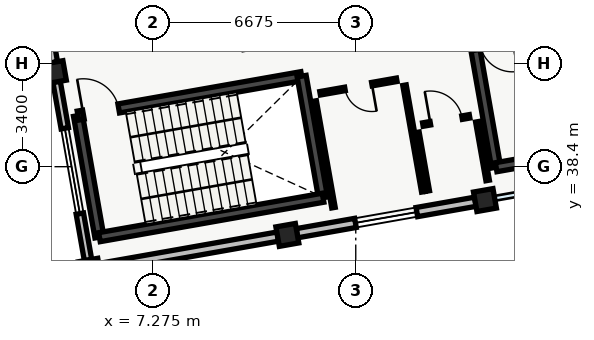
"""IFC4 building model, lengths in metres.
Left out: names, types, materials, properties, quantities, classifications, styles, units other than length and angle.
Written with IfcOpenShell. Run it as: python <this file> out.ifc"""

import sys

from ifc_helpers import new_model, si_unit, direction, frame, frame_2d, origin, origin_2d, place, context, subcontext, project, spatial, rectangle, extrude, element, fill, save


model = new_model("IFC4")
c1 = context("Model", 3, precision=1e-05, world=origin(), true_north=direction((0.0, 1.0)))
c2 = subcontext(c1, "Body", "Model", "MODEL_VIEW")
j1 = project(units=[si_unit("LENGTHUNIT", "METRE"), si_unit("PLANEANGLEUNIT", "RADIAN")], contexts=[c1])
p1 = place(None, origin())
s1 = spatial("IfcSite", under=j1, at=p1, CompositionType="ELEMENT")
p2 = place(p1, origin())
s2 = spatial("IfcBuilding", under=s1, at=p2, CompositionType="ELEMENT")
p3 = place(p2, frame((0.0, 0.0, 9.6)))
s3 = spatial("IfcBuildingStorey", under=s2, at=p3, CompositionType="ELEMENT", Elevation=9.6)
for number, where, z_axis, x_axis in (
    (1, (5.2, 35.01, 0.0), (0.0, 0.0, 1.0), (0.985, 0.174, 0.0)),
    (2, (4.054, 41.51, 0.0), (0.0, 0.0, 1.0), (0.985, 0.174, 0.0)),
    (3, (11.7, 36.156, 0.0), (0.0, 0.0, 1.0), (0.985, 0.174, 0.0)),
    (4, (18.199, 37.302, 0.0), (0.0, 0.0, 1.0), (0.985, 0.174, 0.0)),
):
    element("IfcColumn", number, at=place(p3, frame(where, z_axis=z_axis, x_axis=x_axis)), inside=s3, PredefinedType="COLUMN", context=c2, shape_type="SweptSolid", body=[
        extrude(rectangle(XDim=0.65, YDim=0.65, at=origin_2d()), origin(), (0.0, 0.0, 1.0), 4.32),
    ])
p4 = place(p3, frame((5.145, 35.325, 0.0), z_axis=(0.0, 0.0, 1.0), x_axis=(-0.17368484894, 0.984801286173, 0.0)))
e5 = element("IfcWall", 5, at=p4, inside=s3, PredefinedType="STANDARD", context=c2, shape_type="SweptSolid", body=[
    extrude(rectangle(XDim=5.96, YDim=0.245, at=frame_2d((2.98, 0.0))), origin(), (0.0, 0.0, 1.0), 3.855),
])
p5 = place(p4, frame((1.555, 0.0, 0.95)))
e6 = element("IfcOpeningElement", 6, at=p5, cuts=e5, PredefinedType="OPENING", context=c2, shape_type="SweptSolid", body=[
    extrude(rectangle(XDim=2.85, YDim=1.5, at=frame_2d((1.425, 0.75))), frame((0.0, 0.123, 0.0), z_axis=(0.0, -1.0, 0.0), x_axis=(1.0, 0.0, 0.0)), (0.0, 0.0, 1.0), 0.245),
])
p6 = place(p3, frame((3.998, 41.825, 0.0), z_axis=(0.0, 0.0, 1.0), x_axis=(-0.173645120828, 0.98480829201, 0.0)))
e7 = element("IfcWall", 7, at=p6, inside=s3, PredefinedType="STANDARD", context=c2, shape_type="SweptSolid", body=[
    extrude(rectangle(XDim=5.96, YDim=0.29, at=frame_2d((2.98, 0.0))), origin(), (0.0, 0.0, 1.0), 3.855),
])
p7 = place(p6, frame((2.34, 0.0, 0.95)))
e8 = element("IfcOpeningElement", 8, at=p7, cuts=e7, PredefinedType="OPENING", context=c2, shape_type="SweptSolid", body=[
    extrude(rectangle(XDim=1.28, YDim=1.42, at=frame_2d((0.64, 0.71))), frame((0.0, 0.145, 0.0), z_axis=(0.0, -1.0, 0.0), x_axis=(1.0, 0.0, 0.0)), (0.0, 0.0, 1.0), 0.29),
])
p8 = place(p3, frame((17.884, 37.247, 0.0), z_axis=(0.0, 0.0, 1.0), x_axis=(-0.98480829201, -0.173645120828, 0.0)))
e9 = element("IfcWall", 9, at=p8, inside=s3, PredefinedType="STANDARD", context=c2, shape_type="SweptSolid", body=[
    extrude(rectangle(XDim=5.96, YDim=0.305, at=frame_2d((2.98, 0.0))), origin(), (0.0, 0.0, 1.0), 3.855),
])
p9 = place(p8, frame((1.955, 0.0, 0.95)))
e10 = element("IfcOpeningElement", 10, at=p9, cuts=e9, PredefinedType="OPENING", context=c2, shape_type="SweptSolid", body=[
    extrude(rectangle(XDim=2.05, YDim=1.7, at=frame_2d((1.025, 0.85))), frame((0.0, 0.152, 0.0), z_axis=(0.0, -1.0, 0.0), x_axis=(1.0, 0.0, 0.0)), (0.0, 0.0, 1.0), 0.305),
])
p10 = place(p3, frame((11.385, 36.101, 0.0), z_axis=(0.0, 0.0, 1.0), x_axis=(-0.98480829201, -0.173645120828, 0.0)))
e11 = element("IfcWall", 11, at=p10, inside=s3, PredefinedType="STANDARD", context=c2, shape_type="SweptSolid", body=[
    extrude(rectangle(XDim=5.96, YDim=0.305, at=frame_2d((2.98, 0.0))), origin(), (0.0, 0.0, 1.0), 3.855),
])
p11 = place(p3, frame((5.519, 36.082, 0.0), z_axis=(0.0, 0.0, 1.0), x_axis=(-0.173665267602, 0.984804739443, 0.0)))
e12 = element("IfcWall", 12, at=p11, inside=s3, PredefinedType="SHEAR", context=c2, shape_type="SweptSolid", body=[
    extrude(rectangle(XDim=4.06, YDim=0.3, at=frame_2d((2.03, 0.0))), origin(), (0.0, 0.0, 1.0), 4.28),
])
p12 = place(p3, frame((4.814, 40.08, 0.0), z_axis=(0.0, 0.0, 1.0), x_axis=(0.984802636214, 0.173677193974, 0.0)))
e13 = element("IfcWall", 13, at=p12, inside=s3, PredefinedType="SHEAR", context=c2, shape_type="SweptSolid", body=[
    extrude(rectangle(XDim=7.47, YDim=0.3, at=frame_2d((3.735, 0.0))), origin(), (0.0, 0.0, 1.0), 4.28),
])
p13 = place(p12, frame((0.18, 0.0, 0.0)))
e14 = element("IfcOpeningElement", 14, at=p13, cuts=e13, PredefinedType="OPENING", context=c2, shape_type="SweptSolid", body=[
    extrude(rectangle(XDim=1.18, YDim=2.15, at=frame_2d((0.59, 1.075))), frame((0.0, 0.15, 0.0), z_axis=(0.0, -1.0, 0.0), x_axis=(1.0, 0.0, 0.0)), (0.0, 0.0, 1.0), 0.3),
])
p14 = place(p3, frame((12.17, 41.377, 0.0), z_axis=(0.0, 0.0, 1.0), x_axis=(0.173654983803, -0.984806552883, 0.0)))
e15 = element("IfcWall", 15, at=p14, inside=s3, PredefinedType="SHEAR", context=c2, shape_type="SweptSolid", body=[
    extrude(rectangle(XDim=4.06, YDim=0.3, at=frame_2d((2.03, 0.0))), origin(), (0.0, 0.0, 1.0), 4.28),
])
p15 = place(p3, frame((12.875, 37.379, 0.0), z_axis=(0.0, 0.0, 1.0), x_axis=(-0.984808225754, -0.173645496596, 0.0)))
e16 = element("IfcWall", 16, at=p15, inside=s3, PredefinedType="SHEAR", context=c2, shape_type="SweptSolid", body=[
    extrude(rectangle(XDim=7.47, YDim=0.3, at=frame_2d((3.735, 0.0))), origin(), (0.0, 0.0, 1.0), 4.28),
])
p16 = place(p3, frame((18.567, 38.383, 0.0), z_axis=(0.0, 0.0, 1.0), x_axis=(-0.173606946886, 0.984815022221, 0.0)))
e17 = element("IfcWall", 17, at=p16, inside=s3, PredefinedType="SHEAR", context=c2, shape_type="SweptSolid", body=[
    extrude(rectangle(XDim=4.06, YDim=0.3, at=frame_2d((2.03, 0.0))), origin(), (0.0, 0.0, 1.0), 4.28),
])
p17 = place(p3, frame((25.924, 39.68, 0.0), z_axis=(0.0, 0.0, 1.0), x_axis=(-0.984809211193, -0.173639907711, 0.0)))
e18 = element("IfcWall", 18, at=p17, inside=s3, PredefinedType="SHEAR", context=c2, shape_type="SweptSolid", body=[
    extrude(rectangle(XDim=7.47, YDim=0.3, at=frame_2d((3.735, 0.0))), origin(), (0.0, 0.0, 1.0), 4.28),
])
p18 = place(p3, frame((16.171, 37.574, 0.0), z_axis=(0.0, 0.0, 1.0), x_axis=(-0.173644490041, 0.984808403233, 0.0)))
e19 = element("IfcWall", 19, at=p18, inside=s3, PredefinedType="PARTITIONING", context=c2, shape_type="SweptSolid", body=[
    extrude(rectangle(XDim=3.56, YDim=0.115, at=frame_2d((1.78, 0.0))), origin(), (0.0, 0.0, 1.0), 3.95),
])
p19 = place(p3, frame((15.298, 41.259, 0.0), z_axis=(0.0, 0.0, 1.0), x_axis=(-0.984803714572, -0.17367107924, 0.0)))
e20 = element("IfcWall", 20, at=p19, inside=s3, PredefinedType="PARTITIONING", context=c2, shape_type="SweptSolid", body=[
    extrude(rectangle(XDim=2.56, YDim=0.115, at=frame_2d((1.28, 0.0))), origin(), (0.0, 0.0, 1.0), 3.95),
])
p20 = place(p19, frame((0.83, 0.0, 0.0)))
e21 = element("IfcOpeningElement", 21, at=p20, cuts=e20, PredefinedType="OPENING", context=c2, shape_type="SweptSolid", body=[
    extrude(rectangle(XDim=0.9, YDim=2.1, at=frame_2d((0.45, 1.05))), frame((0.0, 0.058, 0.0), z_axis=(0.0, -1.0, 0.0), x_axis=(1.0, 0.0, 0.0)), (0.0, 0.0, 1.0), 0.115),
])
p21 = place(p3, frame((12.599, 40.559, 0.0), z_axis=(0.0, 0.0, 1.0), x_axis=(0.173644490041, -0.984808403233, 0.0)))
e22 = element("IfcWall", 22, at=p21, inside=s3, PredefinedType="PARTITIONING", context=c2, shape_type="SweptSolid", body=[
    extrude(rectangle(XDim=3.56, YDim=0.115, at=frame_2d((1.78, 0.0))), origin(), (0.0, 0.0, 1.0), 3.95),
])
p22 = place(p3, frame((18.289, 37.948, 0.0), z_axis=(0.0, 0.0, 1.0), x_axis=(-0.173643211285, 0.984808628706, 0.0)))
e23 = element("IfcWall", 23, at=p22, inside=s3, PredefinedType="PARTITIONING", context=c2, shape_type="SweptSolid", body=[
    extrude(rectangle(XDim=1.96, YDim=0.115, at=frame_2d((0.98, 0.0))), origin(), (0.0, 0.0, 1.0), 3.655),
])
p23 = place(p3, frame((17.694, 40.056, 0.0), z_axis=(0.0, 0.0, 1.0), x_axis=(-0.984797734253, -0.173704987291, 0.0)))
e24 = element("IfcWall", 24, at=p23, inside=s3, PredefinedType="PARTITIONING", context=c2, shape_type="SweptSolid", body=[
    extrude(rectangle(XDim=1.56, YDim=0.115, at=frame_2d((0.78, 0.0))), origin(), (0.0, 0.0, 1.0), 3.95),
])
p24 = place(p23, frame((0.25, 0.0, 0.0)))
e25 = element("IfcOpeningElement", 25, at=p24, cuts=e24, PredefinedType="OPENING", context=c2, shape_type="SweptSolid", body=[
    extrude(rectangle(XDim=1.06, YDim=2.12, at=frame_2d((0.53, 1.06))), frame((0.0, 0.058, 0.0), z_axis=(0.0, -1.0, 0.0), x_axis=(1.0, 0.0, 0.0)), (0.0, 0.0, 1.0), 0.115),
])
p25 = place(p3, frame((15.979, 39.53, 0.0), z_axis=(0.0, 0.0, 1.0), x_axis=(0.173643211285, -0.984808628706, 0.0)))
e26 = element("IfcWall", 26, at=p25, inside=s3, PredefinedType="PARTITIONING", context=c2, shape_type="SweptSolid", body=[
    extrude(rectangle(XDim=1.96, YDim=0.115, at=frame_2d((0.98, 0.0))), origin(), (0.0, 0.0, 1.0), 3.95),
])
p26 = place(p5, origin())
e27 = element("IfcWindow", 27, at=p26, inside=s3, PartitioningType="SINGLE_PANEL", PredefinedType="WINDOW", context=c2, shape_type="SweptSolid", body=[
    extrude(rectangle(XDim=2.85, YDim=1.5, at=frame_2d((1.425, 0.75))), frame((0.0, 0.03, 0.0), z_axis=(0.0, -1.0, 0.0), x_axis=(1.0, 0.0, 0.0)), (0.0, 0.0, 1.0), 0.06),
])
fill(e6, e27)
p27 = place(p9, origin())
e28 = element("IfcWindow", 28, at=p27, inside=s3, PartitioningType="SINGLE_PANEL", PredefinedType="WINDOW", context=c2, shape_type="SweptSolid", body=[
    extrude(rectangle(XDim=2.05, YDim=1.7, at=frame_2d((1.025, 0.85))), frame((0.0, 0.03, 0.0), z_axis=(0.0, -1.0, 0.0), x_axis=(1.0, 0.0, 0.0)), (0.0, 0.0, 1.0), 0.06),
])
fill(e10, e28)
p28 = place(p13, origin())
e29 = element("IfcDoor", 29, at=p28, inside=s3, OperationType="SINGLE_SWING_LEFT", PredefinedType="DOOR", context=c2, shape_type="SweptSolid", body=[
    extrude(rectangle(XDim=1.18, YDim=2.15, at=frame_2d((0.59, 1.075))), frame((0.0, 0.025, 0.0), z_axis=(0.0, -1.0, 0.0), x_axis=(1.0, 0.0, 0.0)), (0.0, 0.0, 1.0), 0.05),
])
fill(e14, e29)
p29 = place(p20, origin())
e30 = element("IfcDoor", 30, at=p29, inside=s3, OperationType="SINGLE_SWING_LEFT", PredefinedType="DOOR", context=c2, shape_type="SweptSolid", body=[
    extrude(rectangle(XDim=0.9, YDim=2.1, at=frame_2d((0.45, 1.05))), frame((0.0, 0.025, 0.0), z_axis=(0.0, -1.0, 0.0), x_axis=(1.0, 0.0, 0.0)), (0.0, 0.0, 1.0), 0.05),
])
fill(e21, e30)
p30 = place(p24, origin())
e31 = element("IfcDoor", 31, at=p30, inside=s3, OperationType="SINGLE_SWING_RIGHT", PredefinedType="DOOR", context=c2, shape_type="SweptSolid", body=[
    extrude(rectangle(XDim=1.06, YDim=2.12, at=frame_2d((0.53, 1.06))), frame((0.0, 0.025, 0.0), z_axis=(0.0, -1.0, 0.0), x_axis=(1.0, 0.0, 0.0)), (0.0, 0.0, 1.0), 0.05),
])
fill(e25, e31)
save(model, sys.argv[1])
